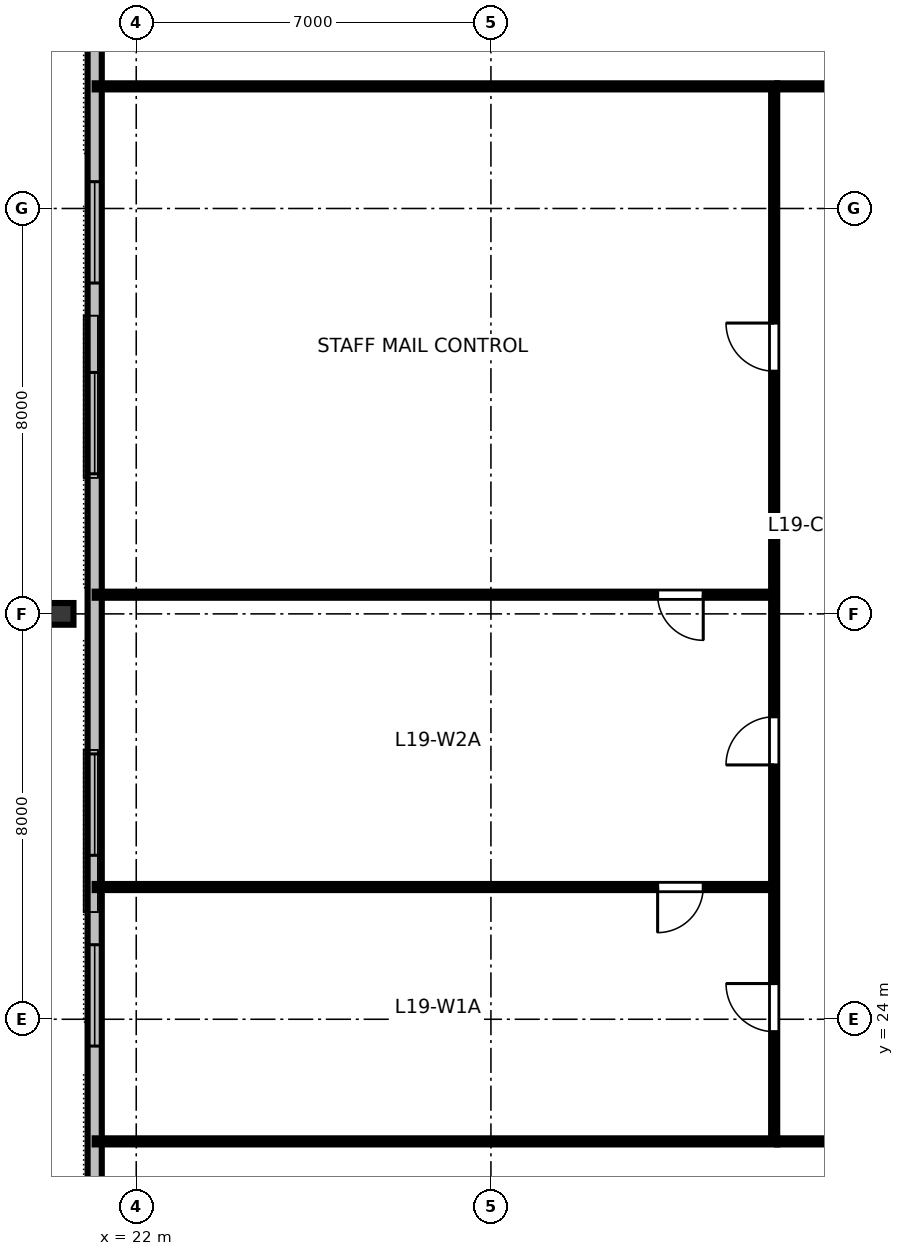
"""IFC4 building model, lengths in metres.
Left out: names, types, materials, properties, quantities, classifications, styles, units other than length and angle.
Written with IfcOpenShell. Run it as: python <this file> out.ifc"""

import sys

from ifc_helpers import new_model, si_unit, direction, frame, frame_2d, origin, origin_2d, place, context, subcontext, project, spatial, rectangle, i_section, extrude, element, fill, save


model = new_model("IFC4")
c1 = context("Model", 3, precision=1e-05, world=origin(), true_north=direction((0.0, 1.0)))
c2 = subcontext(c1, "Body", "Model", "MODEL_VIEW")
j1 = project(units=[si_unit("LENGTHUNIT", "METRE"), si_unit("PLANEANGLEUNIT", "RADIAN")], contexts=[c1])
p1 = place(None, origin())
s1 = spatial("IfcSite", under=j1, at=p1, CompositionType="ELEMENT")
p2 = place(p1, origin())
s2 = spatial("IfcBuilding", under=s1, at=p2, CompositionType="ELEMENT")
p3 = place(p2, frame((0.0, 0.0, 74.8)))
s3 = spatial("IfcBuildingStorey", under=s2, at=p3, CompositionType="ELEMENT", Elevation=74.8)
p4 = place(p3, frame((20.52, 32.0, 0.0), z_axis=(0.0, 0.0, 1.0), x_axis=(0.0, 1.0, 0.0)))
e1 = element("IfcColumn", 1, at=p4, inside=s3, PredefinedType="COLUMN", context=c2, shape_type="SweptSolid", body=[
    extrude(i_section(OverallWidth=0.428, OverallDepth=0.483, WebThickness=0.051, FlangeThickness=0.082, FilletRadius=0.025, at=origin_2d()), origin(), (0.0, 0.0, 1.0), 3.358),
])
p5 = place(p3, frame((21.18, 50.04, 0.0), z_axis=(0.0, 0.0, 1.0), x_axis=(0.0, -1.0, 0.0)))
e2 = element("IfcWall", 2, at=p5, inside=s3, PredefinedType="STANDARD", context=c2, shape_type="SweptSolid", body=[
    extrude(rectangle(XDim=36.08, YDim=0.28, at=frame_2d((18.04, 0.0))), origin(), (0.0, 0.0, 1.0), 3.36),
])
p6 = place(p5, frame((1.982, 0.0, 0.8)))
e3 = element("IfcOpeningElement", 3, at=p6, cuts=e2, PredefinedType="OPENING", context=c2, shape_type="SweptSolid", body=[
    extrude(rectangle(XDim=2.0, YDim=1.95, at=frame_2d((1.0, 0.975))), frame((0.0, 0.15, 0.0), z_axis=(0.0, -1.0, 0.0), x_axis=(1.0, 0.0, 0.0)), (0.0, 0.0, 1.0), 0.3),
])
p7 = place(p5, frame((9.511, 0.0, 0.8)))
e4 = element("IfcOpeningElement", 4, at=p7, cuts=e2, PredefinedType="OPENING", context=c2, shape_type="SweptSolid", body=[
    extrude(rectangle(XDim=2.0, YDim=1.95, at=frame_2d((1.0, 0.975))), frame((0.0, 0.15, 0.0), z_axis=(0.0, -1.0, 0.0), x_axis=(1.0, 0.0, 0.0)), (0.0, 0.0, 1.0), 0.3),
])
p8 = place(p5, frame((13.276, 0.0, 0.8)))
e5 = element("IfcOpeningElement", 5, at=p8, cuts=e2, PredefinedType="OPENING", context=c2, shape_type="SweptSolid", body=[
    extrude(rectangle(XDim=2.0, YDim=1.95, at=frame_2d((1.0, 0.975))), frame((0.0, 0.15, 0.0), z_axis=(0.0, -1.0, 0.0), x_axis=(1.0, 0.0, 0.0)), (0.0, 0.0, 1.0), 0.3),
])
p9 = place(p5, frame((20.804, 0.0, 0.8)))
e6 = element("IfcOpeningElement", 6, at=p9, cuts=e2, PredefinedType="OPENING", context=c2, shape_type="SweptSolid", body=[
    extrude(rectangle(XDim=2.0, YDim=1.95, at=frame_2d((1.0, 0.975))), frame((0.0, 0.15, 0.0), z_axis=(0.0, -1.0, 0.0), x_axis=(1.0, 0.0, 0.0)), (0.0, 0.0, 1.0), 0.3),
])
p10 = place(p5, frame((24.569, 0.0, 0.8)))
e7 = element("IfcOpeningElement", 7, at=p10, cuts=e2, PredefinedType="OPENING", context=c2, shape_type="SweptSolid", body=[
    extrude(rectangle(XDim=2.0, YDim=1.95, at=frame_2d((1.0, 0.975))), frame((0.0, 0.15, 0.0), z_axis=(0.0, -1.0, 0.0), x_axis=(1.0, 0.0, 0.0)), (0.0, 0.0, 1.0), 0.3),
])
p11 = place(p5, frame((32.098, 0.0, 0.8)))
e8 = element("IfcOpeningElement", 8, at=p11, cuts=e2, PredefinedType="OPENING", context=c2, shape_type="SweptSolid", body=[
    extrude(rectangle(XDim=2.0, YDim=1.95, at=frame_2d((1.0, 0.975))), frame((0.0, 0.15, 0.0), z_axis=(0.0, -1.0, 0.0), x_axis=(1.0, 0.0, 0.0)), (0.0, 0.0, 1.0), 0.3),
])
p12 = place(p3, frame((34.65, 21.59, 0.0), z_axis=(0.0, 0.0, 1.0), x_axis=(1.0, 0.0, 0.0)))
e9 = element("IfcWall", 9, at=p12, inside=s3, PredefinedType="PARTITIONING", context=c2, shape_type="SweptSolid", body=[
    extrude(rectangle(XDim=22.7, YDim=0.12, at=frame_2d((11.35, 0.0))), origin(), (0.0, 0.0, 1.0), 2.64),
])
p13 = place(p12, frame((3.463, 0.0, 0.0)))
e10 = element("IfcOpeningElement", 10, at=p13, cuts=e9, PredefinedType="OPENING", context=c2, shape_type="SweptSolid", body=[
    extrude(rectangle(XDim=0.95, YDim=2.15, at=frame_2d((0.475, 1.075))), frame((0.0, 0.07, 0.0), z_axis=(0.0, -1.0, 0.0), x_axis=(1.0, 0.0, 0.0)), (0.0, 0.0, 1.0), 0.14),
])
p14 = place(p12, frame((14.673, 0.0, 0.0)))
e11 = element("IfcOpeningElement", 11, at=p14, cuts=e9, PredefinedType="OPENING", context=c2, shape_type="SweptSolid", body=[
    extrude(rectangle(XDim=0.95, YDim=2.15, at=frame_2d((0.475, 1.075))), frame((0.0, 0.07, 0.0), z_axis=(0.0, -1.0, 0.0), x_axis=(1.0, 0.0, 0.0)), (0.0, 0.0, 1.0), 0.14),
])
p15 = place(p3, frame((34.65, 42.41, 0.0), z_axis=(0.0, 0.0, 1.0), x_axis=(1.0, 0.0, 0.0)))
e12 = element("IfcWall", 12, at=p15, inside=s3, PredefinedType="PARTITIONING", context=c2, shape_type="SweptSolid", body=[
    extrude(rectangle(XDim=22.7, YDim=0.12, at=frame_2d((11.35, 0.0))), origin(), (0.0, 0.0, 1.0), 2.64),
])
p16 = place(p15, frame((4.272, 0.0, 0.0)))
e13 = element("IfcOpeningElement", 13, at=p16, cuts=e12, PredefinedType="OPENING", context=c2, shape_type="SweptSolid", body=[
    extrude(rectangle(XDim=0.95, YDim=2.15, at=frame_2d((0.475, 1.075))), frame((0.0, 0.07, 0.0), z_axis=(0.0, -1.0, 0.0), x_axis=(1.0, 0.0, 0.0)), (0.0, 0.0, 1.0), 0.14),
])
p17 = place(p15, frame((11.432, 0.0, 0.0)))
e14 = element("IfcOpeningElement", 14, at=p17, cuts=e12, PredefinedType="OPENING", context=c2, shape_type="SweptSolid", body=[
    extrude(rectangle(XDim=0.95, YDim=2.15, at=frame_2d((0.475, 1.075))), frame((0.0, 0.07, 0.0), z_axis=(0.0, -1.0, 0.0), x_axis=(1.0, 0.0, 0.0)), (0.0, 0.0, 1.0), 0.14),
])
p18 = place(p15, frame((18.035, 0.0, 0.0)))
e15 = element("IfcOpeningElement", 15, at=p18, cuts=e12, PredefinedType="OPENING", context=c2, shape_type="SweptSolid", body=[
    extrude(rectangle(XDim=0.95, YDim=2.15, at=frame_2d((0.475, 1.075))), frame((0.0, 0.07, 0.0), z_axis=(0.0, -1.0, 0.0), x_axis=(1.0, 0.0, 0.0)), (0.0, 0.0, 1.0), 0.14),
])
p19 = place(p3, frame((34.59, 26.61, 0.0), z_axis=(0.0, 0.0, 1.0), x_axis=(-1.0, 0.0, 0.0)))
e16 = element("IfcWall", 16, at=p19, inside=s3, PredefinedType="PARTITIONING", context=c2, shape_type="SweptSolid", body=[
    extrude(rectangle(XDim=13.41, YDim=0.12, at=frame_2d((6.705, 0.0))), origin(), (0.0, 0.0, 1.0), 2.64),
])
p20 = place(p19, frame((1.4, 0.0, 0.0)))
e17 = element("IfcOpeningElement", 17, at=p20, cuts=e16, PredefinedType="OPENING", context=c2, shape_type="SweptSolid", body=[
    extrude(rectangle(XDim=0.9, YDim=2.15, at=frame_2d((0.45, 1.075))), frame((0.0, 0.07, 0.0), z_axis=(0.0, -1.0, 0.0), x_axis=(1.0, 0.0, 0.0)), (0.0, 0.0, 1.0), 0.14),
])
p21 = place(p3, frame((34.59, 32.378, 0.0), z_axis=(0.0, 0.0, 1.0), x_axis=(-1.0, 0.0, 0.0)))
e18 = element("IfcWall", 18, at=p21, inside=s3, PredefinedType="PARTITIONING", context=c2, shape_type="SweptSolid", body=[
    extrude(rectangle(XDim=13.41, YDim=0.12, at=frame_2d((6.705, 0.0))), origin(), (0.0, 0.0, 1.0), 2.64),
])
p22 = place(p21, frame((1.4, 0.0, 0.0)))
e19 = element("IfcOpeningElement", 19, at=p22, cuts=e18, PredefinedType="OPENING", context=c2, shape_type="SweptSolid", body=[
    extrude(rectangle(XDim=0.9, YDim=2.15, at=frame_2d((0.45, 1.075))), frame((0.0, 0.07, 0.0), z_axis=(0.0, -1.0, 0.0), x_axis=(1.0, 0.0, 0.0)), (0.0, 0.0, 1.0), 0.14),
])
p23 = place(p3, frame((34.59, 21.65, 0.0), z_axis=(0.0, 0.0, 1.0), x_axis=(0.0, 1.0, 0.0)))
e20 = element("IfcWall", 20, at=p23, inside=s3, PredefinedType="PARTITIONING", context=c2, shape_type="SweptSolid", body=[
    extrude(rectangle(XDim=20.7, YDim=0.12, at=frame_2d((10.35, 0.0))), origin(), (0.0, 0.0, 1.0), 2.64),
])
p24 = place(p23, frame((2.105, 0.0, 0.0)))
e21 = element("IfcOpeningElement", 21, at=p24, cuts=e20, PredefinedType="OPENING", context=c2, shape_type="SweptSolid", body=[
    extrude(rectangle(XDim=0.95, YDim=2.15, at=frame_2d((0.475, 1.075))), frame((0.0, 0.07, 0.0), z_axis=(0.0, -1.0, 0.0), x_axis=(1.0, 0.0, 0.0)), (0.0, 0.0, 1.0), 0.14),
])
p25 = place(p23, frame((7.369, 0.0, 0.0)))
e22 = element("IfcOpeningElement", 22, at=p25, cuts=e20, PredefinedType="OPENING", context=c2, shape_type="SweptSolid", body=[
    extrude(rectangle(XDim=0.95, YDim=2.15, at=frame_2d((0.475, 1.075))), frame((0.0, 0.07, 0.0), z_axis=(0.0, -1.0, 0.0), x_axis=(1.0, 0.0, 0.0)), (0.0, 0.0, 1.0), 0.14),
])
p26 = place(p23, frame((15.139, 0.0, 0.0)))
e23 = element("IfcOpeningElement", 23, at=p26, cuts=e20, PredefinedType="OPENING", context=c2, shape_type="SweptSolid", body=[
    extrude(rectangle(XDim=0.95, YDim=2.15, at=frame_2d((0.475, 1.075))), frame((0.0, 0.07, 0.0), z_axis=(0.0, -1.0, 0.0), x_axis=(1.0, 0.0, 0.0)), (0.0, 0.0, 1.0), 0.14),
])
for number, where, z_axis, x_axis in (
    (24, (34.65, 21.59, 0.0), (0.0, 0.0, 1.0), (-1.0, 0.0, 0.0)),
    (25, (34.65, 42.41, 0.0), (0.0, 0.0, 1.0), (-1.0, 0.0, 0.0)),
):
    element("IfcWall", number, at=place(p3, frame(where, z_axis=z_axis, x_axis=x_axis)), inside=s3, PredefinedType="PARTITIONING", context=c2, shape_type="SweptSolid", body=[
        extrude(rectangle(XDim=13.47, YDim=0.12, at=frame_2d((6.735, 0.0))), origin(), (0.0, 0.0, 1.0), 2.64),
    ])
p27 = place(p7, origin())
e26 = element("IfcWindow", 26, at=p27, inside=s3, PartitioningType="SINGLE_PANEL", PredefinedType="WINDOW", context=c2, shape_type="SweptSolid", body=[
    extrude(rectangle(XDim=2.0, YDim=1.95, at=frame_2d((1.0, 0.975))), frame((0.0, 0.03, 0.0), z_axis=(0.0, -1.0, 0.0), x_axis=(1.0, 0.0, 0.0)), (0.0, 0.0, 1.0), 0.06),
])
fill(e4, e26)
p28 = place(p8, origin())
e27 = element("IfcWindow", 27, at=p28, inside=s3, PartitioningType="SINGLE_PANEL", PredefinedType="WINDOW", context=c2, shape_type="SweptSolid", body=[
    extrude(rectangle(XDim=2.0, YDim=1.95, at=frame_2d((1.0, 0.975))), frame((0.0, 0.03, 0.0), z_axis=(0.0, -1.0, 0.0), x_axis=(1.0, 0.0, 0.0)), (0.0, 0.0, 1.0), 0.06),
])
fill(e5, e27)
p29 = place(p9, origin())
e28 = element("IfcWindow", 28, at=p29, inside=s3, PartitioningType="SINGLE_PANEL", PredefinedType="WINDOW", context=c2, shape_type="SweptSolid", body=[
    extrude(rectangle(XDim=2.0, YDim=1.95, at=frame_2d((1.0, 0.975))), frame((0.0, 0.03, 0.0), z_axis=(0.0, -1.0, 0.0), x_axis=(1.0, 0.0, 0.0)), (0.0, 0.0, 1.0), 0.06),
])
fill(e6, e28)
p30 = place(p10, origin())
e29 = element("IfcWindow", 29, at=p30, inside=s3, PartitioningType="SINGLE_PANEL", PredefinedType="WINDOW", context=c2, shape_type="SweptSolid", body=[
    extrude(rectangle(XDim=2.0, YDim=1.95, at=frame_2d((1.0, 0.975))), frame((0.0, 0.03, 0.0), z_axis=(0.0, -1.0, 0.0), x_axis=(1.0, 0.0, 0.0)), (0.0, 0.0, 1.0), 0.06),
])
fill(e7, e29)
p31 = place(p20, origin())
e30 = element("IfcDoor", 30, at=p31, inside=s3, OperationType="SINGLE_SWING_RIGHT", PredefinedType="DOOR", context=c2, shape_type="SweptSolid", body=[
    extrude(rectangle(XDim=0.9, YDim=2.15, at=frame_2d((0.45, 1.075))), frame((0.0, 0.025, 0.0), z_axis=(0.0, -1.0, 0.0), x_axis=(1.0, 0.0, 0.0)), (0.0, 0.0, 1.0), 0.05),
])
fill(e17, e30)
p32 = place(p22, origin())
e31 = element("IfcDoor", 31, at=p32, inside=s3, OperationType="SINGLE_SWING_LEFT", PredefinedType="DOOR", context=c2, shape_type="SweptSolid", body=[
    extrude(rectangle(XDim=0.9, YDim=2.15, at=frame_2d((0.45, 1.075))), frame((0.0, 0.025, 0.0), z_axis=(0.0, -1.0, 0.0), x_axis=(1.0, 0.0, 0.0)), (0.0, 0.0, 1.0), 0.05),
])
fill(e19, e31)
p33 = place(p24, origin())
e32 = element("IfcDoor", 32, at=p33, inside=s3, OperationType="SINGLE_SWING_RIGHT", PredefinedType="DOOR", context=c2, shape_type="SweptSolid", body=[
    extrude(rectangle(XDim=0.95, YDim=2.15, at=frame_2d((0.475, 1.075))), frame((0.0, 0.025, 0.0), z_axis=(0.0, -1.0, 0.0), x_axis=(1.0, 0.0, 0.0)), (0.0, 0.0, 1.0), 0.05),
])
fill(e21, e32)
p34 = place(p25, origin())
e33 = element("IfcDoor", 33, at=p34, inside=s3, OperationType="SINGLE_SWING_LEFT", PredefinedType="DOOR", context=c2, shape_type="SweptSolid", body=[
    extrude(rectangle(XDim=0.95, YDim=2.15, at=frame_2d((0.475, 1.075))), frame((0.0, 0.025, 0.0), z_axis=(0.0, -1.0, 0.0), x_axis=(1.0, 0.0, 0.0)), (0.0, 0.0, 1.0), 0.05),
])
fill(e22, e33)
p35 = place(p26, origin())
e34 = element("IfcDoor", 34, at=p35, inside=s3, OperationType="SINGLE_SWING_RIGHT", PredefinedType="DOOR", context=c2, shape_type="SweptSolid", body=[
    extrude(rectangle(XDim=0.95, YDim=2.15, at=frame_2d((0.475, 1.075))), frame((0.0, 0.025, 0.0), z_axis=(0.0, -1.0, 0.0), x_axis=(1.0, 0.0, 0.0)), (0.0, 0.0, 1.0), 0.05),
])
fill(e23, e34)
save(model, sys.argv[1])
